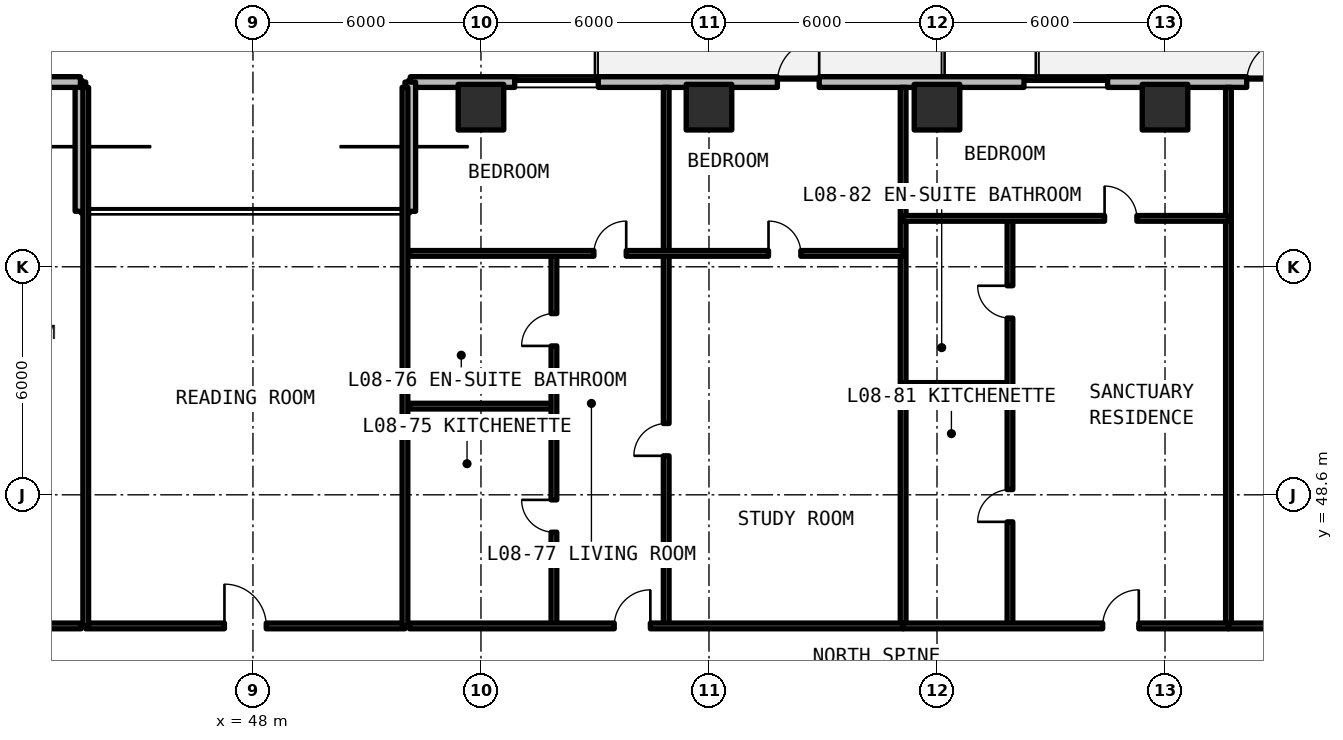
"""IFC4 building model, lengths in metres.
Left out: names, types, materials, properties, quantities, classifications, styles, units other than length and angle.
Written with IfcOpenShell. Run it as: python <this file> out.ifc"""

import sys

from ifc_helpers import new_model, si_unit, direction, frame, frame_2d, origin, origin_2d, place, context, subcontext, project, spatial, rectangle, extrude, element, fill, save


model = new_model("IFC4")
c1 = context("Model", 3, precision=1e-05, world=origin(), true_north=direction((0.0, 1.0)))
c2 = subcontext(c1, "Body", "Model", "MODEL_VIEW")
j1 = project(units=[si_unit("LENGTHUNIT", "METRE"), si_unit("PLANEANGLEUNIT", "RADIAN")], contexts=[c1])
p1 = place(None, origin())
s1 = spatial("IfcSite", under=j1, at=p1, CompositionType="ELEMENT")
p2 = place(p1, origin())
s2 = spatial("IfcBuilding", under=s1, at=p2, CompositionType="ELEMENT")
p3 = place(p2, frame((0.0, 0.0, 32.34)))
s3 = spatial("IfcBuildingStorey", under=s2, at=p3, CompositionType="ELEMENT", Elevation=32.34)
for number, where, z_axis, x_axis in (
    (1, (54.0, 58.8, 0.0), (0.0, 0.0, 1.0), (1.0, 0.0, 0.0)),
    (2, (60.0, 58.8, 0.0), (0.0, 0.0, 1.0), (1.0, 0.0, 0.0)),
    (3, (66.0, 58.8, 0.0), (0.0, 0.0, 1.0), (1.0, 0.0, 0.0)),
    (4, (72.0, 58.8, 0.0), (0.0, 0.0, 1.0), (1.0, 0.0, 0.0)),
):
    element("IfcColumn", number, at=place(p3, frame(where, z_axis=z_axis, x_axis=x_axis)), inside=s3, PredefinedType="COLUMN", context=c2, shape_type="SweptSolid", body=[
        extrude(rectangle(XDim=1.2, YDim=1.2, at=origin_2d()), origin(), (0.0, 0.0, 1.0), 3.3),
    ])
p4 = place(p3, frame((96.542, 59.46, 0.0), z_axis=(0.0, 0.0, 1.0), x_axis=(-1.0, 0.0, 0.0)))
e5 = element("IfcWall", 5, at=p4, inside=s3, PredefinedType="SOLIDWALL", context=c2, shape_type="SweptSolid", body=[
    extrude(rectangle(XDim=44.402, YDim=0.28, at=frame_2d((22.201, 0.0))), origin(), (0.0, 0.0, 1.0), 3.08),
])
p5 = place(p4, frame((33.642, 0.0, 0.0)))
e6 = element("IfcOpeningElement", 6, at=p5, cuts=e5, PredefinedType="OPENING", context=c2, shape_type="SweptSolid", body=[
    extrude(rectangle(XDim=1.1, YDim=2.15, at=frame_2d((0.55, 1.075))), frame((0.0, 0.15, 0.0), z_axis=(0.0, -1.0, 0.0), x_axis=(1.0, 0.0, 0.0)), (0.0, 0.0, 1.0), 0.3),
])
p6 = place(p4, frame((21.292, 0.0, 0.0)))
e7 = element("IfcOpeningElement", 7, at=p6, cuts=e5, PredefinedType="OPENING", context=c2, shape_type="SweptSolid", body=[
    extrude(rectangle(XDim=1.1, YDim=2.15, at=frame_2d((0.55, 1.075))), frame((0.0, 0.15, 0.0), z_axis=(0.0, -1.0, 0.0), x_axis=(1.0, 0.0, 0.0)), (0.0, 0.0, 1.0), 0.3),
])
p7 = place(p4, frame((9.692, 0.0, 0.0)))
e8 = element("IfcOpeningElement", 8, at=p7, cuts=e5, PredefinedType="OPENING", context=c2, shape_type="SweptSolid", body=[
    extrude(rectangle(XDim=1.1, YDim=2.15, at=frame_2d((0.55, 1.075))), frame((0.0, 0.15, 0.0), z_axis=(0.0, -1.0, 0.0), x_axis=(1.0, 0.0, 0.0)), (0.0, 0.0, 1.0), 0.3),
])
p8 = place(p4, frame((39.455, 0.0, 0.78)))
e9 = element("IfcOpeningElement", 9, at=p8, cuts=e5, PredefinedType="OPENING", context=c2, shape_type="SweptSolid", body=[
    extrude(rectangle(XDim=2.2, YDim=1.66, at=frame_2d((1.1, 0.83))), frame((0.0, 0.15, 0.0), z_axis=(0.0, -1.0, 0.0), x_axis=(1.0, 0.0, 0.0)), (0.0, 0.0, 1.0), 0.3),
])
p9 = place(p4, frame((26.053, 0.0, 0.78)))
e10 = element("IfcOpeningElement", 10, at=p9, cuts=e5, PredefinedType="OPENING", context=c2, shape_type="SweptSolid", body=[
    extrude(rectangle(XDim=2.2, YDim=1.66, at=frame_2d((1.1, 0.83))), frame((0.0, 0.15, 0.0), z_axis=(0.0, -1.0, 0.0), x_axis=(1.0, 0.0, 0.0)), (0.0, 0.0, 1.0), 0.3),
])
p10 = place(p4, frame((2.098, 0.0, 0.78)))
e11 = element("IfcOpeningElement", 11, at=p10, cuts=e5, PredefinedType="OPENING", context=c2, shape_type="SweptSolid", body=[
    extrude(rectangle(XDim=2.2, YDim=1.66, at=frame_2d((1.1, 0.83))), frame((0.0, 0.15, 0.0), z_axis=(0.0, -1.0, 0.0), x_axis=(1.0, 0.0, 0.0)), (0.0, 0.0, 1.0), 0.3),
])
for number, where, z_axis, x_axis in (
    (12, (52.14, 59.46, 0.0), (0.0, 0.0, 1.0), (0.0, -1.0, 0.0)),
    (13, (43.46, 56.06, 0.0), (0.0, 0.0, 1.0), (0.0, 1.0, 0.0)),
):
    element("IfcWall", number, at=place(p3, frame(where, z_axis=z_axis, x_axis=x_axis)), inside=s3, PredefinedType="SOLIDWALL", context=c2, shape_type="SweptSolid", body=[
        extrude(rectangle(XDim=3.4, YDim=0.28, at=frame_2d((1.7, 0.0))), origin(), (0.0, 0.0, 1.0), 3.08),
    ])
p11 = place(p3, frame((43.46, 59.46, 0.0), z_axis=(0.0, 0.0, 1.0), x_axis=(-1.0, 0.0, 0.0)))
e14 = element("IfcWall", 14, at=p11, inside=s3, PredefinedType="SOLIDWALL", context=c2, shape_type="SweptSolid", body=[
    extrude(rectangle(XDim=22.602, YDim=0.28, at=frame_2d((11.301, 0.0))), origin(), (0.0, 0.0, 1.0), 3.08),
])
p12 = place(p11, frame((16.11, 0.0, 0.0)))
e15 = element("IfcOpeningElement", 15, at=p12, cuts=e14, PredefinedType="OPENING", context=c2, shape_type="SweptSolid", body=[
    extrude(rectangle(XDim=1.1, YDim=2.15, at=frame_2d((0.55, 1.075))), frame((0.0, 0.15, 0.0), z_axis=(0.0, -1.0, 0.0), x_axis=(1.0, 0.0, 0.0)), (0.0, 0.0, 1.0), 0.3),
])
p13 = place(p11, frame((20.221, 0.0, 0.78)))
e16 = element("IfcOpeningElement", 16, at=p13, cuts=e14, PredefinedType="OPENING", context=c2, shape_type="SweptSolid", body=[
    extrude(rectangle(XDim=1.4, YDim=1.65, at=frame_2d((0.7, 0.825))), frame((0.0, 0.15, 0.0), z_axis=(0.0, -1.0, 0.0), x_axis=(1.0, 0.0, 0.0)), (0.0, 0.0, 1.0), 0.3),
])
p14 = place(p11, frame((9.471, 0.0, 0.78)))
e17 = element("IfcOpeningElement", 17, at=p14, cuts=e14, PredefinedType="OPENING", context=c2, shape_type="SweptSolid", body=[
    extrude(rectangle(XDim=2.2, YDim=1.66, at=frame_2d((1.1, 0.83))), frame((0.0, 0.15, 0.0), z_axis=(0.0, -1.0, 0.0), x_axis=(1.0, 0.0, 0.0)), (0.0, 0.0, 1.0), 0.3),
])
p15 = place(p11, frame((5.193, 0.0, 0.78)))
e18 = element("IfcOpeningElement", 18, at=p15, cuts=e14, PredefinedType="OPENING", context=c2, shape_type="SweptSolid", body=[
    extrude(rectangle(XDim=1.4, YDim=1.65, at=frame_2d((0.7, 0.825))), frame((0.0, 0.15, 0.0), z_axis=(0.0, -1.0, 0.0), x_axis=(1.0, 0.0, 0.0)), (0.0, 0.0, 1.0), 0.3),
])
p16 = place(p11, frame((2.26, 0.0, 0.78)))
e19 = element("IfcOpeningElement", 19, at=p16, cuts=e14, PredefinedType="OPENING", context=c2, shape_type="SweptSolid", body=[
    extrude(rectangle(XDim=1.4, YDim=1.65, at=frame_2d((0.7, 0.825))), frame((0.0, 0.15, 0.0), z_axis=(0.0, -1.0, 0.0), x_axis=(1.0, 0.0, 0.0)), (0.0, 0.0, 1.0), 0.3),
])
p17 = place(p3, frame((43.6, 45.15, 0.0), z_axis=(0.0, 0.0, 1.0), x_axis=(1.0, 0.0, 0.0)))
e20 = element("IfcWall", 20, at=p17, inside=s3, PredefinedType="SOLIDWALL", context=c2, shape_type="SweptSolid", body=[
    extrude(rectangle(XDim=8.4, YDim=0.15, at=frame_2d((4.2, 0.0))), origin(), (0.0, 0.0, 1.0), 2.35),
])
p18 = place(p17, frame((3.65, 0.0, 0.0)))
e21 = element("IfcOpeningElement", 21, at=p18, cuts=e20, PredefinedType="OPENING", context=c2, shape_type="SweptSolid", body=[
    extrude(rectangle(XDim=1.1, YDim=2.15, at=frame_2d((0.55, 1.075))), frame((0.0, 0.085, 0.0), z_axis=(0.0, -1.0, 0.0), x_axis=(1.0, 0.0, 0.0)), (0.0, 0.0, 1.0), 0.17),
])
for number, where, z_axis, x_axis in (
    (22, (43.6, 45.15, 0.0), (0.0, 0.0, 1.0), (0.0, 1.0, 0.0)),
    (23, (52.0, 45.15, 0.0), (0.0, 0.0, 1.0), (0.0, 1.0, 0.0)),
):
    element("IfcWall", number, at=place(p3, frame(where, z_axis=z_axis, x_axis=x_axis)), inside=s3, PredefinedType="SOLIDWALL", context=c2, shape_type="SweptSolid", body=[
        extrude(rectangle(XDim=14.17, YDim=0.15, at=frame_2d((7.085, 0.0))), origin(), (0.0, 0.0, 1.0), 2.35),
    ])
p19 = place(p3, frame((39.121, 45.15, 0.0), z_axis=(0.0, 0.0, 1.0), x_axis=(1.0, 0.0, 0.0)))
e24 = element("IfcWall", 24, at=p19, inside=s3, PredefinedType="SOLIDWALL", context=c2, shape_type="SweptSolid", body=[
    extrude(rectangle(XDim=4.359, YDim=0.15, at=frame_2d((2.179, 0.0))), origin(), (0.0, 0.0, 1.0), 2.35),
])
p20 = place(p19, frame((1.704, 0.0, 0.0)))
e25 = element("IfcOpeningElement", 25, at=p20, cuts=e24, PredefinedType="OPENING", context=c2, shape_type="SweptSolid", body=[
    extrude(rectangle(XDim=0.95, YDim=2.15, at=frame_2d((0.475, 1.075))), frame((0.0, 0.085, 0.0), z_axis=(0.0, -1.0, 0.0), x_axis=(1.0, 0.0, 0.0)), (0.0, 0.0, 1.0), 0.17),
])
p21 = place(p3, frame((65.109, 45.15, 0.0), z_axis=(0.0, 0.0, 1.0), x_axis=(0.0, 1.0, 0.0)))
e26 = element("IfcWall", 26, at=p21, inside=s3, PredefinedType="SOLIDWALL", context=c2, shape_type="SweptSolid", body=[
    extrude(rectangle(XDim=14.17, YDim=0.15, at=frame_2d((7.085, 0.0))), origin(), (0.0, 0.0, 1.0), 2.35),
])
p22 = place(p3, frame((58.874, 45.15, 0.0), z_axis=(0.0, 0.0, 1.0), x_axis=(0.0, 1.0, 0.0)))
e27 = element("IfcWall", 27, at=p22, inside=s3, PredefinedType="PARTITIONING", context=c2, shape_type="SweptSolid", body=[
    extrude(rectangle(XDim=9.802, YDim=0.15, at=frame_2d((4.901, 0.0))), origin(), (0.0, 0.0, 1.0), 2.35),
])
p23 = place(p22, frame((4.476, 0.0, 0.0)))
e28 = element("IfcOpeningElement", 28, at=p23, cuts=e27, PredefinedType="OPENING", context=c2, shape_type="SweptSolid", body=[
    extrude(rectangle(XDim=0.85, YDim=2.1, at=frame_2d((0.425, 1.05))), frame((0.0, 0.085, 0.0), z_axis=(0.0, -1.0, 0.0), x_axis=(1.0, 0.0, 0.0)), (0.0, 0.0, 1.0), 0.17),
])
p24 = place(p3, frame((52.12, 50.933, 0.0), z_axis=(0.0, 0.0, 1.0), x_axis=(1.0, 0.0, 0.0)))
e29 = element("IfcWall", 29, at=p24, inside=s3, PredefinedType="PARTITIONING", context=c2, shape_type="SweptSolid", body=[
    extrude(rectangle(XDim=3.8, YDim=0.15, at=frame_2d((1.9, 0.0))), origin(), (0.0, 0.0, 1.0), 2.35),
])
p25 = place(p3, frame((55.92, 45.15, 0.0), z_axis=(0.0, 0.0, 1.0), x_axis=(0.0, 1.0, 0.0)))
e30 = element("IfcWall", 30, at=p25, inside=s3, PredefinedType="PARTITIONING", context=c2, shape_type="SweptSolid", body=[
    extrude(rectangle(XDim=9.802, YDim=0.15, at=frame_2d((4.901, 0.0))), origin(), (0.0, 0.0, 1.0), 2.35),
])
p26 = place(p25, frame((2.467, 0.0, 0.0)))
e31 = element("IfcOpeningElement", 31, at=p26, cuts=e30, PredefinedType="OPENING", context=c2, shape_type="SweptSolid", body=[
    extrude(rectangle(XDim=0.85, YDim=2.1, at=frame_2d((0.425, 1.05))), frame((0.0, 0.085, 0.0), z_axis=(0.0, -1.0, 0.0), x_axis=(1.0, 0.0, 0.0)), (0.0, 0.0, 1.0), 0.17),
])
p27 = place(p25, frame((7.368, 0.0, 0.0)))
e32 = element("IfcOpeningElement", 32, at=p27, cuts=e30, PredefinedType="OPENING", context=c2, shape_type="SweptSolid", body=[
    extrude(rectangle(XDim=0.85, YDim=2.1, at=frame_2d((0.425, 1.05))), frame((0.0, 0.085, 0.0), z_axis=(0.0, -1.0, 0.0), x_axis=(1.0, 0.0, 0.0)), (0.0, 0.0, 1.0), 0.17),
])
p28 = place(p3, frame((58.874, 54.952, 0.0), z_axis=(0.0, 0.0, 1.0), x_axis=(0.0, 1.0, 0.0)))
e33 = element("IfcWall", 33, at=p28, inside=s3, PredefinedType="PARTITIONING", context=c2, shape_type="SweptSolid", body=[
    extrude(rectangle(XDim=4.368, YDim=0.15, at=frame_2d((2.184, 0.0))), origin(), (0.0, 0.0, 1.0), 2.35),
])
p29 = place(p3, frame((52.12, 54.952, 0.0), z_axis=(0.0, 0.0, 1.0), x_axis=(1.0, 0.0, 0.0)))
e34 = element("IfcWall", 34, at=p29, inside=s3, PredefinedType="PARTITIONING", context=c2, shape_type="SweptSolid", body=[
    extrude(rectangle(XDim=12.989, YDim=0.15, at=frame_2d((6.494, 0.0))), origin(), (0.0, 0.0, 1.0), 2.35),
])
p30 = place(p29, frame((4.852, 0.0, 0.0)))
e35 = element("IfcOpeningElement", 35, at=p30, cuts=e34, PredefinedType="OPENING", context=c2, shape_type="SweptSolid", body=[
    extrude(rectangle(XDim=0.85, YDim=2.1, at=frame_2d((0.425, 1.05))), frame((0.0, 0.085, 0.0), z_axis=(0.0, -1.0, 0.0), x_axis=(1.0, 0.0, 0.0)), (0.0, 0.0, 1.0), 0.17),
])
p31 = place(p29, frame((9.447, 0.0, 0.0)))
e36 = element("IfcOpeningElement", 36, at=p31, cuts=e34, PredefinedType="OPENING", context=c2, shape_type="SweptSolid", body=[
    extrude(rectangle(XDim=0.85, YDim=2.1, at=frame_2d((0.425, 1.05))), frame((0.0, 0.085, 0.0), z_axis=(0.0, -1.0, 0.0), x_axis=(1.0, 0.0, 0.0)), (0.0, 0.0, 1.0), 0.17),
])
p32 = place(p3, frame((52.12, 45.15, 0.0), z_axis=(0.0, 0.0, 1.0), x_axis=(1.0, 0.0, 0.0)))
e37 = element("IfcWall", 37, at=p32, inside=s3, PredefinedType="SOLIDWALL", context=c2, shape_type="SweptSolid", body=[
    extrude(rectangle(XDim=12.989, YDim=0.15, at=frame_2d((6.494, 0.0))), origin(), (0.0, 0.0, 1.0), 2.35),
])
p33 = place(p32, frame((5.387, 0.0, 0.0)))
e38 = element("IfcOpeningElement", 38, at=p33, cuts=e37, PredefinedType="OPENING", context=c2, shape_type="SweptSolid", body=[
    extrude(rectangle(XDim=0.95, YDim=2.15, at=frame_2d((0.475, 1.075))), frame((0.0, 0.085, 0.0), z_axis=(0.0, -1.0, 0.0), x_axis=(1.0, 0.0, 0.0)), (0.0, 0.0, 1.0), 0.17),
])
p34 = place(p3, frame((73.67, 45.15, 0.0), z_axis=(0.0, 0.0, 1.0), x_axis=(0.0, 1.0, 0.0)))
e39 = element("IfcWall", 39, at=p34, inside=s3, PredefinedType="SOLIDWALL", context=c2, shape_type="SweptSolid", body=[
    extrude(rectangle(XDim=14.17, YDim=0.15, at=frame_2d((7.085, 0.0))), origin(), (0.0, 0.0, 1.0), 2.35),
])
p35 = place(p3, frame((65.109, 51.477, 0.0), z_axis=(0.0, 0.0, 1.0), x_axis=(1.0, 0.0, 0.0)))
e40 = element("IfcWall", 40, at=p35, inside=s3, PredefinedType="PARTITIONING", context=c2, shape_type="SweptSolid", body=[
    extrude(rectangle(XDim=2.811, YDim=0.15, at=frame_2d((1.406, 0.0))), origin(), (0.0, 0.0, 1.0), 2.35),
])
p36 = place(p3, frame((67.92, 45.15, 0.0), z_axis=(0.0, 0.0, 1.0), x_axis=(0.0, 1.0, 0.0)))
e41 = element("IfcWall", 41, at=p36, inside=s3, PredefinedType="PARTITIONING", context=c2, shape_type="SweptSolid", body=[
    extrude(rectangle(XDim=10.724, YDim=0.15, at=frame_2d((5.362, 0.0))), origin(), (0.0, 0.0, 1.0), 2.35),
])
p37 = place(p36, frame((2.739, 0.0, 0.0)))
e42 = element("IfcOpeningElement", 42, at=p37, cuts=e41, PredefinedType="OPENING", context=c2, shape_type="SweptSolid", body=[
    extrude(rectangle(XDim=0.85, YDim=2.1, at=frame_2d((0.425, 1.05))), frame((0.0, 0.085, 0.0), z_axis=(0.0, -1.0, 0.0), x_axis=(1.0, 0.0, 0.0)), (0.0, 0.0, 1.0), 0.17),
])
p38 = place(p36, frame((8.101, 0.0, 0.0)))
e43 = element("IfcOpeningElement", 43, at=p38, cuts=e41, PredefinedType="OPENING", context=c2, shape_type="SweptSolid", body=[
    extrude(rectangle(XDim=0.85, YDim=2.1, at=frame_2d((0.425, 1.05))), frame((0.0, 0.085, 0.0), z_axis=(0.0, -1.0, 0.0), x_axis=(1.0, 0.0, 0.0)), (0.0, 0.0, 1.0), 0.17),
])
p39 = place(p3, frame((65.109, 55.874, 0.0), z_axis=(0.0, 0.0, 1.0), x_axis=(1.0, 0.0, 0.0)))
e44 = element("IfcWall", 44, at=p39, inside=s3, PredefinedType="PARTITIONING", context=c2, shape_type="SweptSolid", body=[
    extrude(rectangle(XDim=8.561, YDim=0.15, at=frame_2d((4.28, 0.0))), origin(), (0.0, 0.0, 1.0), 2.35),
])
p40 = place(p39, frame((5.301, 0.0, 0.0)))
e45 = element("IfcOpeningElement", 45, at=p40, cuts=e44, PredefinedType="OPENING", context=c2, shape_type="SweptSolid", body=[
    extrude(rectangle(XDim=0.85, YDim=2.1, at=frame_2d((0.425, 1.05))), frame((0.0, 0.085, 0.0), z_axis=(0.0, -1.0, 0.0), x_axis=(1.0, 0.0, 0.0)), (0.0, 0.0, 1.0), 0.17),
])
p41 = place(p3, frame((65.109, 45.15, 0.0), z_axis=(0.0, 0.0, 1.0), x_axis=(1.0, 0.0, 0.0)))
e46 = element("IfcWall", 46, at=p41, inside=s3, PredefinedType="SOLIDWALL", context=c2, shape_type="SweptSolid", body=[
    extrude(rectangle(XDim=8.561, YDim=0.15, at=frame_2d((4.28, 0.0))), origin(), (0.0, 0.0, 1.0), 2.35),
])
p42 = place(p41, frame((5.251, 0.0, 0.0)))
e47 = element("IfcOpeningElement", 47, at=p42, cuts=e46, PredefinedType="OPENING", context=c2, shape_type="SweptSolid", body=[
    extrude(rectangle(XDim=0.95, YDim=2.15, at=frame_2d((0.475, 1.075))), frame((0.0, 0.085, 0.0), z_axis=(0.0, -1.0, 0.0), x_axis=(1.0, 0.0, 0.0)), (0.0, 0.0, 1.0), 0.17),
])
p43 = place(p3, frame((73.67, 45.15, 0.0), z_axis=(0.0, 0.0, 1.0), x_axis=(1.0, 0.0, 0.0)))
e48 = element("IfcWall", 48, at=p43, inside=s3, PredefinedType="SOLIDWALL", context=c2, shape_type="SweptSolid", body=[
    extrude(rectangle(XDim=10.037, YDim=0.15, at=frame_2d((5.018, 0.0))), origin(), (0.0, 0.0, 1.0), 2.35),
])
p44 = place(p43, frame((4.469, 0.0, 0.0)))
e49 = element("IfcOpeningElement", 49, at=p44, cuts=e48, PredefinedType="OPENING", context=c2, shape_type="SweptSolid", body=[
    extrude(rectangle(XDim=1.1, YDim=2.15, at=frame_2d((0.55, 1.075))), frame((0.0, 0.085, 0.0), z_axis=(0.0, -1.0, 0.0), x_axis=(1.0, 0.0, 0.0)), (0.0, 0.0, 1.0), 0.17),
])
p45 = place(p5, frame((1.1, 0.0, 0.0), z_axis=(0.0, 0.0, 1.0), x_axis=(-1.0, 0.0, 0.0)))
e50 = element("IfcDoor", 50, at=p45, inside=s3, OperationType="SINGLE_SWING_LEFT", PredefinedType="DOOR", context=c2, shape_type="SweptSolid", body=[
    extrude(rectangle(XDim=1.1, YDim=2.15, at=frame_2d((0.55, 1.075))), frame((0.0, 0.025, 0.0), z_axis=(0.0, -1.0, 0.0), x_axis=(1.0, 0.0, 0.0)), (0.0, 0.0, 1.0), 0.05),
])
fill(e6, e50)
p46 = place(p6, frame((1.1, 0.0, 0.0), z_axis=(0.0, 0.0, 1.0), x_axis=(-1.0, 0.0, 0.0)))
e51 = element("IfcDoor", 51, at=p46, inside=s3, OperationType="SINGLE_SWING_RIGHT", PredefinedType="DOOR", context=c2, shape_type="SweptSolid", body=[
    extrude(rectangle(XDim=1.1, YDim=2.15, at=frame_2d((0.55, 1.075))), frame((0.0, 0.025, 0.0), z_axis=(0.0, -1.0, 0.0), x_axis=(1.0, 0.0, 0.0)), (0.0, 0.0, 1.0), 0.05),
])
fill(e7, e51)
p47 = place(p8, origin())
e52 = element("IfcWindow", 52, at=p47, inside=s3, PartitioningType="SINGLE_PANEL", PredefinedType="WINDOW", context=c2, shape_type="SweptSolid", body=[
    extrude(rectangle(XDim=2.2, YDim=1.66, at=frame_2d((1.1, 0.83))), frame((0.0, 0.03, 0.0), z_axis=(0.0, -1.0, 0.0), x_axis=(1.0, 0.0, 0.0)), (0.0, 0.0, 1.0), 0.06),
])
fill(e9, e52)
p48 = place(p9, origin())
e53 = element("IfcWindow", 53, at=p48, inside=s3, PartitioningType="SINGLE_PANEL", PredefinedType="WINDOW", context=c2, shape_type="SweptSolid", body=[
    extrude(rectangle(XDim=2.2, YDim=1.66, at=frame_2d((1.1, 0.83))), frame((0.0, 0.03, 0.0), z_axis=(0.0, -1.0, 0.0), x_axis=(1.0, 0.0, 0.0)), (0.0, 0.0, 1.0), 0.06),
])
fill(e10, e53)
p49 = place(p18, origin())
e54 = element("IfcDoor", 54, at=p49, inside=s3, OperationType="SINGLE_SWING_LEFT", PredefinedType="DOOR", context=c2, shape_type="SweptSolid", body=[
    extrude(rectangle(XDim=1.1, YDim=2.15, at=frame_2d((0.55, 1.075))), frame((0.0, 0.025, 0.0), z_axis=(0.0, -1.0, 0.0), x_axis=(1.0, 0.0, 0.0)), (0.0, 0.0, 1.0), 0.05),
])
fill(e21, e54)
p50 = place(p23, origin())
e55 = element("IfcDoor", 55, at=p50, inside=s3, OperationType="SINGLE_SWING_LEFT", PredefinedType="DOOR", context=c2, shape_type="SweptSolid", body=[
    extrude(rectangle(XDim=0.85, YDim=2.1, at=frame_2d((0.425, 1.05))), frame((0.0, 0.025, 0.0), z_axis=(0.0, -1.0, 0.0), x_axis=(1.0, 0.0, 0.0)), (0.0, 0.0, 1.0), 0.05),
])
fill(e28, e55)
p51 = place(p26, origin())
e56 = element("IfcDoor", 56, at=p51, inside=s3, OperationType="SINGLE_SWING_RIGHT", PredefinedType="DOOR", context=c2, shape_type="SweptSolid", body=[
    extrude(rectangle(XDim=0.85, YDim=2.1, at=frame_2d((0.425, 1.05))), frame((0.0, 0.025, 0.0), z_axis=(0.0, -1.0, 0.0), x_axis=(1.0, 0.0, 0.0)), (0.0, 0.0, 1.0), 0.05),
])
fill(e31, e56)
p52 = place(p27, origin())
e57 = element("IfcDoor", 57, at=p52, inside=s3, OperationType="SINGLE_SWING_LEFT", PredefinedType="DOOR", context=c2, shape_type="SweptSolid", body=[
    extrude(rectangle(XDim=0.85, YDim=2.1, at=frame_2d((0.425, 1.05))), frame((0.0, 0.025, 0.0), z_axis=(0.0, -1.0, 0.0), x_axis=(1.0, 0.0, 0.0)), (0.0, 0.0, 1.0), 0.05),
])
fill(e32, e57)
p53 = place(p30, origin())
e58 = element("IfcDoor", 58, at=p53, inside=s3, OperationType="SINGLE_SWING_RIGHT", PredefinedType="DOOR", context=c2, shape_type="SweptSolid", body=[
    extrude(rectangle(XDim=0.85, YDim=2.1, at=frame_2d((0.425, 1.05))), frame((0.0, 0.025, 0.0), z_axis=(0.0, -1.0, 0.0), x_axis=(1.0, 0.0, 0.0)), (0.0, 0.0, 1.0), 0.05),
])
fill(e35, e58)
p54 = place(p31, origin())
e59 = element("IfcDoor", 59, at=p54, inside=s3, OperationType="SINGLE_SWING_LEFT", PredefinedType="DOOR", context=c2, shape_type="SweptSolid", body=[
    extrude(rectangle(XDim=0.85, YDim=2.1, at=frame_2d((0.425, 1.05))), frame((0.0, 0.025, 0.0), z_axis=(0.0, -1.0, 0.0), x_axis=(1.0, 0.0, 0.0)), (0.0, 0.0, 1.0), 0.05),
])
fill(e36, e59)
p55 = place(p33, origin())
e60 = element("IfcDoor", 60, at=p55, inside=s3, OperationType="SINGLE_SWING_RIGHT", PredefinedType="DOOR", context=c2, shape_type="SweptSolid", body=[
    extrude(rectangle(XDim=0.95, YDim=2.15, at=frame_2d((0.475, 1.075))), frame((0.0, 0.025, 0.0), z_axis=(0.0, -1.0, 0.0), x_axis=(1.0, 0.0, 0.0)), (0.0, 0.0, 1.0), 0.05),
])
fill(e38, e60)
p56 = place(p37, origin())
e61 = element("IfcDoor", 61, at=p56, inside=s3, OperationType="SINGLE_SWING_LEFT", PredefinedType="DOOR", context=c2, shape_type="SweptSolid", body=[
    extrude(rectangle(XDim=0.85, YDim=2.1, at=frame_2d((0.425, 1.05))), frame((0.0, 0.025, 0.0), z_axis=(0.0, -1.0, 0.0), x_axis=(1.0, 0.0, 0.0)), (0.0, 0.0, 1.0), 0.05),
])
fill(e42, e61)
p57 = place(p38, origin())
e62 = element("IfcDoor", 62, at=p57, inside=s3, OperationType="SINGLE_SWING_RIGHT", PredefinedType="DOOR", context=c2, shape_type="SweptSolid", body=[
    extrude(rectangle(XDim=0.85, YDim=2.1, at=frame_2d((0.425, 1.05))), frame((0.0, 0.025, 0.0), z_axis=(0.0, -1.0, 0.0), x_axis=(1.0, 0.0, 0.0)), (0.0, 0.0, 1.0), 0.05),
])
fill(e43, e62)
p58 = place(p40, origin())
e63 = element("IfcDoor", 63, at=p58, inside=s3, OperationType="SINGLE_SWING_LEFT", PredefinedType="DOOR", context=c2, shape_type="SweptSolid", body=[
    extrude(rectangle(XDim=0.85, YDim=2.1, at=frame_2d((0.425, 1.05))), frame((0.0, 0.025, 0.0), z_axis=(0.0, -1.0, 0.0), x_axis=(1.0, 0.0, 0.0)), (0.0, 0.0, 1.0), 0.05),
])
fill(e45, e63)
p59 = place(p42, origin())
e64 = element("IfcDoor", 64, at=p59, inside=s3, OperationType="SINGLE_SWING_RIGHT", PredefinedType="DOOR", context=c2, shape_type="SweptSolid", body=[
    extrude(rectangle(XDim=0.95, YDim=2.15, at=frame_2d((0.475, 1.075))), frame((0.0, 0.025, 0.0), z_axis=(0.0, -1.0, 0.0), x_axis=(1.0, 0.0, 0.0)), (0.0, 0.0, 1.0), 0.05),
])
fill(e47, e64)
save(model, sys.argv[1])
